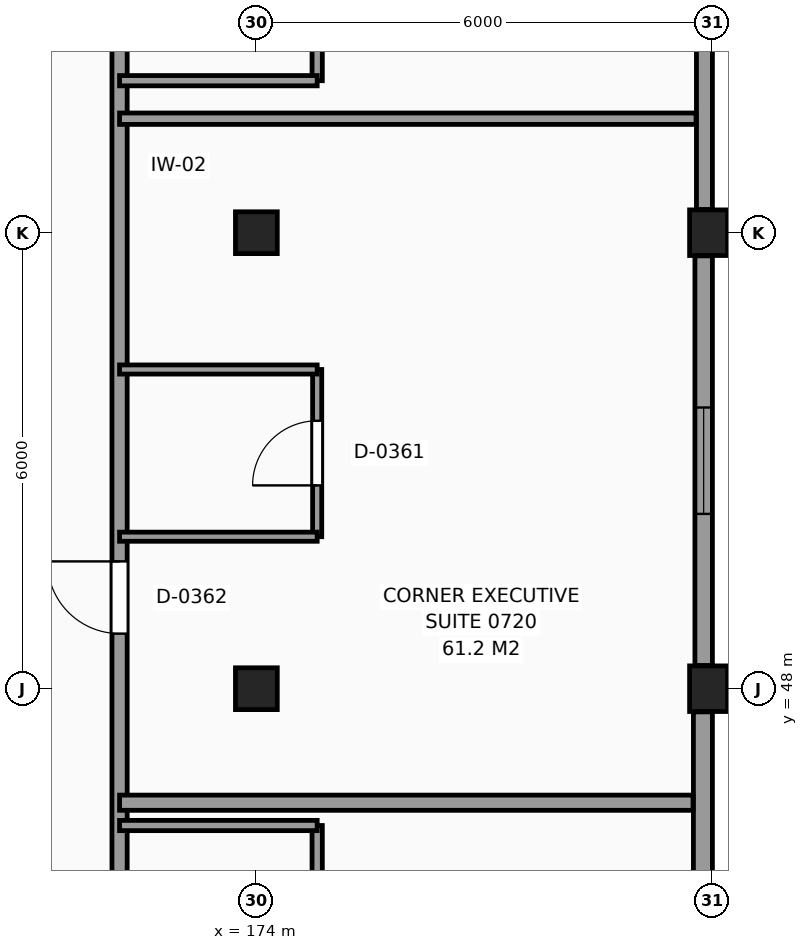
"""IFC4 building model, lengths in metres.
Left out: names, types, materials, properties, quantities, classifications, styles, units other than length and angle.
Written with IfcOpenShell. Run it as: python <this file> out.ifc"""

import sys

from ifc_helpers import new_model, si_unit, direction, frame, frame_2d, origin, origin_2d, place, context, subcontext, project, spatial, rectangle, extrude, element, fill, save


model = new_model("IFC4")
c1 = context("Model", 3, precision=1e-05, world=origin(), true_north=direction((0.0, 1.0)))
c2 = subcontext(c1, "Body", "Model", "MODEL_VIEW")
j1 = project(units=[si_unit("LENGTHUNIT", "METRE"), si_unit("PLANEANGLEUNIT", "RADIAN")], contexts=[c1])
p1 = place(None, origin())
s1 = spatial("IfcSite", under=j1, at=p1, CompositionType="ELEMENT")
p2 = place(p1, origin())
s2 = spatial("IfcBuilding", under=s1, at=p2, CompositionType="ELEMENT")
p3 = place(p2, frame((0.0, 0.0, 31.5)))
s3 = spatial("IfcBuildingStorey", under=s2, at=p3, CompositionType="ELEMENT", Elevation=31.5)
for number, where, z_axis, x_axis in (
    (1, (174.0, 48.0, 0.0), (0.0, 0.0, 1.0), (1.0, 0.0, 0.0)),
    (2, (174.0, 54.0, 0.0), (0.0, 0.0, 1.0), (1.0, 0.0, 0.0)),
):
    element("IfcColumn", number, at=place(p3, frame(where, z_axis=z_axis, x_axis=x_axis)), inside=s3, PredefinedType="COLUMN", context=c2, shape_type="SweptSolid", body=[
        extrude(rectangle(XDim=0.55, YDim=0.55, at=origin_2d()), origin(), (0.0, 0.0, 1.0), 3.3),
    ])
for number, where, z_axis, x_axis in (
    (3, (180.0, 48.0, 0.0), (0.0, 0.0, 1.0), (1.0, 0.0, 0.0)),
    (4, (180.0, 54.0, 0.0), (0.0, 0.0, 1.0), (1.0, 0.0, 0.0)),
):
    element("IfcColumn", number, at=place(p3, frame(where, z_axis=z_axis, x_axis=x_axis)), inside=s3, PredefinedType="COLUMN", context=c2, shape_type="SweptSolid", body=[
        extrude(rectangle(XDim=0.6, YDim=0.6, at=origin_2d()), origin(), (0.0, 0.0, 1.0), 3.3),
    ])
p4 = place(p3, frame((179.875, 42.305, 0.0), z_axis=(0.0, 0.0, 1.0), x_axis=(0.0, 1.0, 0.0)))
e5 = element("IfcWall", 5, at=p4, inside=s3, PredefinedType="SOLIDWALL", context=c2, shape_type="SweptSolid", body=[
    extrude(rectangle(XDim=5.39, YDim=0.25, at=frame_2d((2.695, 0.0))), origin(), (0.0, 0.0, 1.0), 2.42),
])
p5 = place(p4, frame((1.407, 0.0, 0.8)))
e6 = element("IfcOpeningElement", 6, at=p5, cuts=e5, PredefinedType="OPENING", context=c2, shape_type="SweptSolid", body=[
    extrude(rectangle(XDim=1.4, YDim=1.4, at=frame_2d((0.7, 0.7))), frame((0.0, 0.135, 0.0), z_axis=(0.0, -1.0, 0.0), x_axis=(1.0, 0.0, 0.0)), (0.0, 0.0, 1.0), 0.27),
])
p6 = place(p3, frame((179.885, 48.305, 0.0), z_axis=(0.0, 0.0, 1.0), x_axis=(0.0, 1.0, 0.0)))
e7 = element("IfcWall", 7, at=p6, inside=s3, PredefinedType="SOLIDWALL", context=c2, shape_type="SweptSolid", body=[
    extrude(rectangle(XDim=5.39, YDim=0.23, at=frame_2d((2.695, 0.0))), origin(), (0.0, 0.0, 1.0), 2.42),
])
p7 = place(p6, frame((1.995, 0.0, 0.8)))
e8 = element("IfcOpeningElement", 8, at=p7, cuts=e7, PredefinedType="OPENING", context=c2, shape_type="SweptSolid", body=[
    extrude(rectangle(XDim=1.4, YDim=1.4, at=frame_2d((0.7, 0.7))), frame((0.0, 0.125, 0.0), z_axis=(0.0, -1.0, 0.0), x_axis=(1.0, 0.0, 0.0)), (0.0, 0.0, 1.0), 0.25),
])
p8 = place(p3, frame((179.895, 54.305, 0.0), z_axis=(0.0, 0.0, 1.0), x_axis=(0.0, 1.0, 0.0)))
e9 = element("IfcWall", 9, at=p8, inside=s3, PredefinedType="SOLIDWALL", context=c2, shape_type="SweptSolid", body=[
    extrude(rectangle(XDim=5.39, YDim=0.21, at=frame_2d((2.695, 0.0))), origin(), (0.0, 0.0, 1.0), 2.42),
])
p9 = place(p8, frame((2.583, 0.0, 0.8)))
e10 = element("IfcOpeningElement", 10, at=p9, cuts=e9, PredefinedType="OPENING", context=c2, shape_type="SweptSolid", body=[
    extrude(rectangle(XDim=1.4, YDim=1.4, at=frame_2d((0.7, 0.7))), frame((0.0, 0.115, 0.0), z_axis=(0.0, -1.0, 0.0), x_axis=(1.0, 0.0, 0.0)), (0.0, 0.0, 1.0), 0.23),
])
p10 = place(p3, frame((172.2, 42.255, 0.0), z_axis=(0.0, 0.0, 1.0), x_axis=(0.0, 1.0, 0.0)))
e11 = element("IfcWall", 11, at=p10, inside=s3, PredefinedType="PARTITIONING", context=c2, shape_type="SweptSolid", body=[
    extrude(rectangle(XDim=65.565, YDim=0.2, at=frame_2d((32.783, 0.0))), origin(), (0.0, 0.0, 1.0), 3.07),
])
p11 = place(p10, frame((0.42, 0.0, 0.0)))
e12 = element("IfcOpeningElement", 12, at=p11, cuts=e11, PredefinedType="OPENING", context=c2, shape_type="SweptSolid", body=[
    extrude(rectangle(XDim=0.95, YDim=2.1, at=frame_2d((0.475, 1.05))), frame((0.0, 0.11, 0.0), z_axis=(0.0, -1.0, 0.0), x_axis=(1.0, 0.0, 0.0)), (0.0, 0.0, 1.0), 0.22),
])
p12 = place(p10, frame((6.47, 0.0, 0.0)))
e13 = element("IfcOpeningElement", 13, at=p12, cuts=e11, PredefinedType="OPENING", context=c2, shape_type="SweptSolid", body=[
    extrude(rectangle(XDim=0.95, YDim=2.1, at=frame_2d((0.475, 1.05))), frame((0.0, 0.11, 0.0), z_axis=(0.0, -1.0, 0.0), x_axis=(1.0, 0.0, 0.0)), (0.0, 0.0, 1.0), 0.22),
])
p13 = place(p10, frame((16.27, 0.0, 0.0)))
e14 = element("IfcOpeningElement", 14, at=p13, cuts=e11, PredefinedType="OPENING", context=c2, shape_type="SweptSolid", body=[
    extrude(rectangle(XDim=0.95, YDim=2.1, at=frame_2d((0.475, 1.05))), frame((0.0, 0.11, 0.0), z_axis=(0.0, -1.0, 0.0), x_axis=(1.0, 0.0, 0.0)), (0.0, 0.0, 1.0), 0.22),
])
p14 = place(p10, frame((18.47, 0.0, 0.0)))
e15 = element("IfcOpeningElement", 15, at=p14, cuts=e11, PredefinedType="OPENING", context=c2, shape_type="SweptSolid", body=[
    extrude(rectangle(XDim=0.95, YDim=2.1, at=frame_2d((0.475, 1.05))), frame((0.0, 0.11, 0.0), z_axis=(0.0, -1.0, 0.0), x_axis=(1.0, 0.0, 0.0)), (0.0, 0.0, 1.0), 0.22),
])
p15 = place(p10, frame((22.87, 0.0, 0.0)))
e16 = element("IfcOpeningElement", 16, at=p15, cuts=e11, PredefinedType="OPENING", context=c2, shape_type="SweptSolid", body=[
    extrude(rectangle(XDim=0.95, YDim=2.1, at=frame_2d((0.475, 1.05))), frame((0.0, 0.11, 0.0), z_axis=(0.0, -1.0, 0.0), x_axis=(1.0, 0.0, 0.0)), (0.0, 0.0, 1.0), 0.22),
])
p16 = place(p10, frame((27.37, 0.0, 0.0)))
e17 = element("IfcOpeningElement", 17, at=p16, cuts=e11, PredefinedType="OPENING", context=c2, shape_type="SweptSolid", body=[
    extrude(rectangle(XDim=0.95, YDim=2.1, at=frame_2d((0.475, 1.05))), frame((0.0, 0.11, 0.0), z_axis=(0.0, -1.0, 0.0), x_axis=(1.0, 0.0, 0.0)), (0.0, 0.0, 1.0), 0.22),
])
p17 = place(p10, frame((36.47, 0.0, 0.0)))
e18 = element("IfcOpeningElement", 18, at=p17, cuts=e11, PredefinedType="OPENING", context=c2, shape_type="SweptSolid", body=[
    extrude(rectangle(XDim=0.95, YDim=2.1, at=frame_2d((0.475, 1.05))), frame((0.0, 0.11, 0.0), z_axis=(0.0, -1.0, 0.0), x_axis=(1.0, 0.0, 0.0)), (0.0, 0.0, 1.0), 0.22),
])
p18 = place(p10, frame((40.87, 0.0, 0.0)))
e19 = element("IfcOpeningElement", 19, at=p18, cuts=e11, PredefinedType="OPENING", context=c2, shape_type="SweptSolid", body=[
    extrude(rectangle(XDim=0.95, YDim=2.1, at=frame_2d((0.475, 1.05))), frame((0.0, 0.11, 0.0), z_axis=(0.0, -1.0, 0.0), x_axis=(1.0, 0.0, 0.0)), (0.0, 0.0, 1.0), 0.22),
])
p19 = place(p10, frame((48.07, 0.0, 0.0)))
e20 = element("IfcOpeningElement", 20, at=p19, cuts=e11, PredefinedType="OPENING", context=c2, shape_type="SweptSolid", body=[
    extrude(rectangle(XDim=0.95, YDim=2.1, at=frame_2d((0.475, 1.05))), frame((0.0, 0.11, 0.0), z_axis=(0.0, -1.0, 0.0), x_axis=(1.0, 0.0, 0.0)), (0.0, 0.0, 1.0), 0.22),
])
p20 = place(p10, frame((56.32, 0.0, 0.0)))
e21 = element("IfcOpeningElement", 21, at=p20, cuts=e11, PredefinedType="OPENING", context=c2, shape_type="SweptSolid", body=[
    extrude(rectangle(XDim=0.95, YDim=2.1, at=frame_2d((0.475, 1.05))), frame((0.0, 0.11, 0.0), z_axis=(0.0, -1.0, 0.0), x_axis=(1.0, 0.0, 0.0)), (0.0, 0.0, 1.0), 0.22),
])
p21 = place(p10, frame((60.47, 0.0, 0.0)))
e22 = element("IfcOpeningElement", 22, at=p21, cuts=e11, PredefinedType="OPENING", context=c2, shape_type="SweptSolid", body=[
    extrude(rectangle(XDim=0.95, YDim=2.1, at=frame_2d((0.475, 1.05))), frame((0.0, 0.11, 0.0), z_axis=(0.0, -1.0, 0.0), x_axis=(1.0, 0.0, 0.0)), (0.0, 0.0, 1.0), 0.22),
])
p22 = place(p3, frame((174.8, 44.0, 0.0), z_axis=(0.0, 0.0, 1.0), x_axis=(0.0, 1.0, 0.0)))
e23 = element("IfcWall", 23, at=p22, inside=s3, PredefinedType="PARTITIONING", context=c2, shape_type="SweptSolid", body=[
    extrude(rectangle(XDim=2.2, YDim=0.135, at=frame_2d((1.1, 0.0))), origin(), (0.0, 0.0, 1.0), 3.07),
])
p23 = place(p22, frame((0.675, 0.0, 0.0)))
e24 = element("IfcOpeningElement", 24, at=p23, cuts=e23, PredefinedType="OPENING", context=c2, shape_type="SweptSolid", body=[
    extrude(rectangle(XDim=0.85, YDim=2.1, at=frame_2d((0.425, 1.05))), frame((0.0, 0.078, 0.0), z_axis=(0.0, -1.0, 0.0), x_axis=(1.0, 0.0, 0.0)), (0.0, 0.0, 1.0), 0.155),
])
p24 = place(p3, frame((174.8, 50.0, 0.0), z_axis=(0.0, 0.0, 1.0), x_axis=(0.0, 1.0, 0.0)))
e25 = element("IfcWall", 25, at=p24, inside=s3, PredefinedType="PARTITIONING", context=c2, shape_type="SweptSolid", body=[
    extrude(rectangle(XDim=2.2, YDim=0.12, at=frame_2d((1.1, 0.0))), origin(), (0.0, 0.0, 1.0), 3.07),
])
p25 = place(p24, frame((0.675, 0.0, 0.0)))
e26 = element("IfcOpeningElement", 26, at=p25, cuts=e25, PredefinedType="OPENING", context=c2, shape_type="SweptSolid", body=[
    extrude(rectangle(XDim=0.85, YDim=2.1, at=frame_2d((0.425, 1.05))), frame((0.0, 0.07, 0.0), z_axis=(0.0, -1.0, 0.0), x_axis=(1.0, 0.0, 0.0)), (0.0, 0.0, 1.0), 0.14),
])
p26 = place(p3, frame((174.8, 56.0, 0.0), z_axis=(0.0, 0.0, 1.0), x_axis=(0.0, 1.0, 0.0)))
e27 = element("IfcWall", 27, at=p26, inside=s3, PredefinedType="PARTITIONING", context=c2, shape_type="SweptSolid", body=[
    extrude(rectangle(XDim=2.2, YDim=0.135, at=frame_2d((1.1, 0.0))), origin(), (0.0, 0.0, 1.0), 3.07),
])
p27 = place(p26, frame((0.675, 0.0, 0.0)))
e28 = element("IfcOpeningElement", 28, at=p27, cuts=e27, PredefinedType="OPENING", context=c2, shape_type="SweptSolid", body=[
    extrude(rectangle(XDim=0.85, YDim=2.1, at=frame_2d((0.425, 1.05))), frame((0.0, 0.078, 0.0), z_axis=(0.0, -1.0, 0.0), x_axis=(1.0, 0.0, 0.0)), (0.0, 0.0, 1.0), 0.155),
])
p28 = place(p3, frame((172.2, 46.2, 0.0), z_axis=(0.0, 0.0, 1.0), x_axis=(1.0, 0.0, 0.0)))
e29 = element("IfcWall", 29, at=p28, inside=s3, PredefinedType="PARTITIONING", context=c2, shape_type="SweptSolid", body=[
    extrude(rectangle(XDim=2.6, YDim=0.135, at=frame_2d((1.3, 0.0))), origin(), (0.0, 0.0, 1.0), 3.07),
])
p29 = place(p3, frame((172.2, 46.5, 0.0), z_axis=(0.0, 0.0, 1.0), x_axis=(1.0, 0.0, 0.0)))
e30 = element("IfcWall", 30, at=p29, inside=s3, PredefinedType="PARTITIONING", context=c2, shape_type="SweptSolid", body=[
    extrude(rectangle(XDim=7.545, YDim=0.2, at=frame_2d((3.772, 0.0))), origin(), (0.0, 0.0, 1.0), 3.07),
])
for number, where, z_axis, x_axis in (
    (31, (172.2, 50.0, 0.0), (0.0, 0.0, 1.0), (1.0, 0.0, 0.0)),
    (32, (172.2, 52.2, 0.0), (0.0, 0.0, 1.0), (1.0, 0.0, 0.0)),
):
    element("IfcWall", number, at=place(p3, frame(where, z_axis=z_axis, x_axis=x_axis)), inside=s3, PredefinedType="PARTITIONING", context=c2, shape_type="SweptSolid", body=[
        extrude(rectangle(XDim=2.6, YDim=0.12, at=frame_2d((1.3, 0.0))), origin(), (0.0, 0.0, 1.0), 3.07),
    ])
p30 = place(p3, frame((172.2, 55.5, 0.0), z_axis=(0.0, 0.0, 1.0), x_axis=(1.0, 0.0, 0.0)))
e33 = element("IfcWall", 33, at=p30, inside=s3, PredefinedType="PARTITIONING", context=c2, shape_type="SweptSolid", body=[
    extrude(rectangle(XDim=7.585, YDim=0.15, at=frame_2d((3.792, 0.0))), origin(), (0.0, 0.0, 1.0), 3.07),
])
p31 = place(p3, frame((172.2, 56.0, 0.0), z_axis=(0.0, 0.0, 1.0), x_axis=(1.0, 0.0, 0.0)))
e34 = element("IfcWall", 34, at=p31, inside=s3, PredefinedType="PARTITIONING", context=c2, shape_type="SweptSolid", body=[
    extrude(rectangle(XDim=2.6, YDim=0.135, at=frame_2d((1.3, 0.0))), origin(), (0.0, 0.0, 1.0), 3.07),
])
p32 = place(p7, origin())
e35 = element("IfcWindow", 35, at=p32, inside=s3, PartitioningType="SINGLE_PANEL", PredefinedType="WINDOW", context=c2, shape_type="SweptSolid", body=[
    extrude(rectangle(XDim=1.4, YDim=1.4, at=frame_2d((0.7, 0.7))), frame((0.0, 0.03, 0.0), z_axis=(0.0, -1.0, 0.0), x_axis=(1.0, 0.0, 0.0)), (0.0, 0.0, 1.0), 0.06),
])
fill(e8, e35)
p33 = place(p25, origin())
e36 = element("IfcDoor", 36, at=p33, inside=s3, OperationType="SINGLE_SWING_LEFT", PredefinedType="DOOR", context=c2, shape_type="SweptSolid", body=[
    extrude(rectangle(XDim=0.85, YDim=2.1, at=frame_2d((0.425, 1.05))), frame((0.0, 0.025, 0.0), z_axis=(0.0, -1.0, 0.0), x_axis=(1.0, 0.0, 0.0)), (0.0, 0.0, 1.0), 0.05),
])
fill(e26, e36)
p34 = place(p12, origin())
e37 = element("IfcDoor", 37, at=p34, inside=s3, OperationType="SINGLE_SWING_RIGHT", PredefinedType="DOOR", context=c2, shape_type="SweptSolid", body=[
    extrude(rectangle(XDim=0.95, YDim=2.1, at=frame_2d((0.475, 1.05))), frame((0.0, 0.025, 0.0), z_axis=(0.0, -1.0, 0.0), x_axis=(1.0, 0.0, 0.0)), (0.0, 0.0, 1.0), 0.05),
])
fill(e13, e37)
save(model, sys.argv[1])
